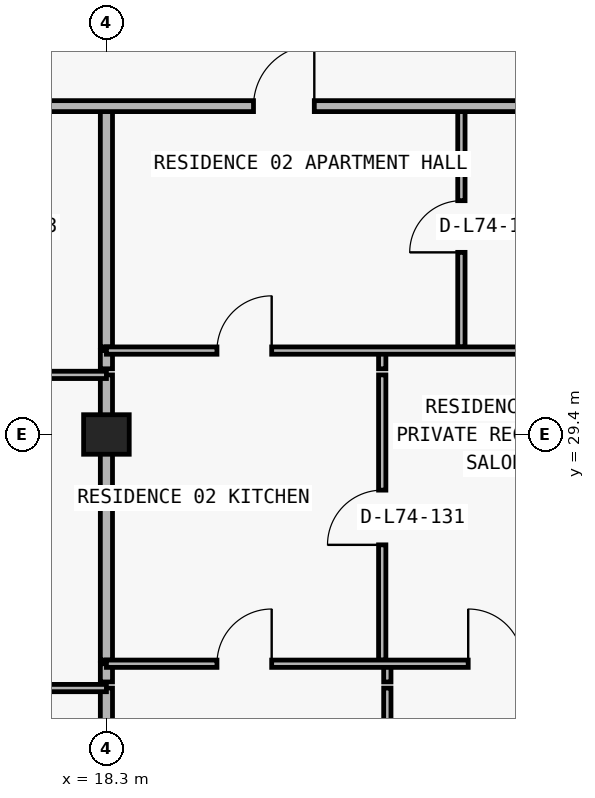
"""IFC4 building model, lengths in metres.
Left out: names, types, materials, properties, quantities, classifications, styles, units other than length and angle.
Written with IfcOpenShell. Run it as: python <this file> out.ifc"""

import sys

from ifc_helpers import new_model, si_unit, direction, frame, frame_2d, origin, origin_2d, place, context, subcontext, project, spatial, rectangle, extrude, element, fill, save


model = new_model("IFC4")
c1 = context("Model", 3, precision=1e-05, world=origin(), true_north=direction((0.0, 1.0)))
c2 = subcontext(c1, "Body", "Model", "MODEL_VIEW")
j1 = project(units=[si_unit("LENGTHUNIT", "METRE"), si_unit("PLANEANGLEUNIT", "RADIAN")], contexts=[c1])
p1 = place(None, origin())
s1 = spatial("IfcSite", under=j1, at=p1, CompositionType="ELEMENT")
p2 = place(p1, origin())
s2 = spatial("IfcBuilding", under=s1, at=p2, CompositionType="ELEMENT")
p3 = place(p2, frame((0.0, 0.0, 262.8)))
s3 = spatial("IfcBuildingStorey", under=s2, at=p3, CompositionType="ELEMENT", Elevation=262.8)
p4 = place(p3, frame((18.3, 29.4, 0.0), z_axis=(0.0, 0.0, 1.0), x_axis=(1.0, 0.0, 0.0)))
e1 = element("IfcColumn", 1, at=p4, inside=s3, PredefinedType="COLUMN", context=c2, shape_type="SweptSolid", body=[
    extrude(rectangle(XDim=0.75, YDim=0.65, at=origin_2d()), origin(), (0.0, 0.0, 1.0), 3.05),
])
p5 = place(p3, frame((18.3, 13.34, 0.0), z_axis=(0.0, 0.0, 1.0), x_axis=(0.0, 1.0, 0.0)))
e2 = element("IfcWall", 2, at=p5, inside=s3, PredefinedType="PARTITIONING", context=c2, shape_type="SweptSolid", body=[
    extrude(rectangle(XDim=11.89, YDim=0.2, at=frame_2d((5.945, 0.0))), origin(), (0.0, 0.0, 1.0), 2.263),
])
p6 = place(p3, frame((18.3, 25.33, 0.0), z_axis=(0.0, 0.0, 1.0), x_axis=(0.0, 1.0, 0.0)))
e3 = element("IfcWall", 3, at=p6, inside=s3, PredefinedType="PARTITIONING", context=c2, shape_type="SweptSolid", body=[
    extrude(rectangle(XDim=0.3, YDim=0.2, at=frame_2d((0.15, 0.0))), origin(), (0.0, 0.0, 1.0), 2.263),
])
p7 = place(p3, frame((18.3, 25.69, 0.0), z_axis=(0.0, 0.0, 1.0), x_axis=(0.0, 1.0, 0.0)))
e4 = element("IfcWall", 4, at=p7, inside=s3, PredefinedType="PARTITIONING", context=c2, shape_type="SweptSolid", body=[
    extrude(rectangle(XDim=4.69, YDim=0.2, at=frame_2d((2.345, 0.0))), origin(), (0.0, 0.0, 1.0), 2.263),
])
p8 = place(p3, frame((18.3, 30.48, 0.0), z_axis=(0.0, 0.0, 1.0), x_axis=(0.0, 1.0, 0.0)))
e5 = element("IfcWall", 5, at=p8, inside=s3, PredefinedType="PARTITIONING", context=c2, shape_type="SweptSolid", body=[
    extrude(rectangle(XDim=0.3, YDim=0.2, at=frame_2d((0.15, 0.0))), origin(), (0.0, 0.0, 1.0), 2.263),
])
p9 = place(p3, frame((18.3, 30.84, 0.0), z_axis=(0.0, 0.0, 1.0), x_axis=(0.0, 1.0, 0.0)))
e6 = element("IfcWall", 6, at=p9, inside=s3, PredefinedType="PARTITIONING", context=c2, shape_type="SweptSolid", body=[
    extrude(rectangle(XDim=3.96, YDim=0.2, at=frame_2d((1.98, 0.0))), origin(), (0.0, 0.0, 1.0), 2.263),
])
p10 = place(p3, frame((22.836, 25.69, 0.0), z_axis=(0.0, 0.0, 1.0), x_axis=(0.0, 1.0, 0.0)))
e7 = element("IfcWall", 7, at=p10, inside=s3, PredefinedType="PARTITIONING", context=c2, shape_type="SweptSolid", body=[
    extrude(rectangle(XDim=4.69, YDim=0.12, at=frame_2d((2.345, 0.0))), origin(), (0.0, 0.0, 1.0), 3.05),
])
p11 = place(p10, frame((1.895, 0.0, 0.0)))
e8 = element("IfcOpeningElement", 8, at=p11, cuts=e7, PredefinedType="OPENING", context=c2, shape_type="SweptSolid", body=[
    extrude(rectangle(XDim=0.9, YDim=2.15, at=frame_2d((0.45, 1.075))), frame((0.0, 0.07, 0.0), z_axis=(0.0, -1.0, 0.0), x_axis=(1.0, 0.0, 0.0)), (0.0, 0.0, 1.0), 0.14),
])
p12 = place(p3, frame((22.836, 30.48, 0.0), z_axis=(0.0, 0.0, 1.0), x_axis=(0.0, 1.0, 0.0)))
e9 = element("IfcWall", 9, at=p12, inside=s3, PredefinedType="PARTITIONING", context=c2, shape_type="SweptSolid", body=[
    extrude(rectangle(XDim=0.3, YDim=0.12, at=frame_2d((0.15, 0.0))), origin(), (0.0, 0.0, 1.0), 3.05),
])
p13 = place(p3, frame((22.92, 13.34, 0.0), z_axis=(0.0, 0.0, 1.0), x_axis=(0.0, 1.0, 0.0)))
e10 = element("IfcWall", 10, at=p13, inside=s3, PredefinedType="PARTITIONING", context=c2, shape_type="SweptSolid", body=[
    extrude(rectangle(XDim=11.89, YDim=0.12, at=frame_2d((5.945, 0.0))), origin(), (0.0, 0.0, 1.0), 3.05),
])
p14 = place(p3, frame((22.92, 25.33, 0.0), z_axis=(0.0, 0.0, 1.0), x_axis=(0.0, 1.0, 0.0)))
e11 = element("IfcWall", 11, at=p14, inside=s3, PredefinedType="PARTITIONING", context=c2, shape_type="SweptSolid", body=[
    extrude(rectangle(XDim=0.3, YDim=0.12, at=frame_2d((0.15, 0.0))), origin(), (0.0, 0.0, 1.0), 3.05),
])
p15 = place(p3, frame((24.138, 30.84, 0.0), z_axis=(0.0, 0.0, 1.0), x_axis=(0.0, 1.0, 0.0)))
e12 = element("IfcWall", 12, at=p15, inside=s3, PredefinedType="PARTITIONING", context=c2, shape_type="SweptSolid", body=[
    extrude(rectangle(XDim=3.96, YDim=0.12, at=frame_2d((1.98, 0.0))), origin(), (0.0, 0.0, 1.0), 3.05),
])
p16 = place(p15, frame((1.555, 0.0, 0.0)))
e13 = element("IfcOpeningElement", 13, at=p16, cuts=e12, PredefinedType="OPENING", context=c2, shape_type="SweptSolid", body=[
    extrude(rectangle(XDim=0.85, YDim=2.1, at=frame_2d((0.425, 1.05))), frame((0.0, 0.07, 0.0), z_axis=(0.0, -1.0, 0.0), x_axis=(1.0, 0.0, 0.0)), (0.0, 0.0, 1.0), 0.14),
])
p17 = place(p3, frame((15.203, 25.23, 0.0), z_axis=(0.0, 0.0, 1.0), x_axis=(1.0, 0.0, 0.0)))
e14 = element("IfcWall", 14, at=p17, inside=s3, PredefinedType="PARTITIONING", context=c2, shape_type="SweptSolid", body=[
    extrude(rectangle(XDim=3.097, YDim=0.12, at=frame_2d((1.549, 0.0))), origin(), (0.0, 0.0, 1.0), 3.05),
])
p18 = place(p17, frame((1.098, 0.0, 0.0)))
e15 = element("IfcOpeningElement", 15, at=p18, cuts=e14, PredefinedType="OPENING", context=c2, shape_type="SweptSolid", body=[
    extrude(rectangle(XDim=0.9, YDim=2.15, at=frame_2d((0.45, 1.075))), frame((0.0, 0.07, 0.0), z_axis=(0.0, -1.0, 0.0), x_axis=(1.0, 0.0, 0.0)), (0.0, 0.0, 1.0), 0.14),
])
p19 = place(p3, frame((18.3, 25.63, 0.0), z_axis=(0.0, 0.0, 1.0), x_axis=(1.0, 0.0, 0.0)))
e16 = element("IfcWall", 16, at=p19, inside=s3, PredefinedType="PARTITIONING", context=c2, shape_type="SweptSolid", body=[
    extrude(rectangle(XDim=8.18, YDim=0.12, at=frame_2d((4.09, 0.0))), origin(), (0.0, 0.0, 1.0), 3.05),
])
p20 = place(p19, frame((1.818, 0.0, 0.0)))
e17 = element("IfcOpeningElement", 17, at=p20, cuts=e16, PredefinedType="OPENING", context=c2, shape_type="SweptSolid", body=[
    extrude(rectangle(XDim=0.9, YDim=2.15, at=frame_2d((0.45, 1.075))), frame((0.0, 0.07, 0.0), z_axis=(0.0, -1.0, 0.0), x_axis=(1.0, 0.0, 0.0)), (0.0, 0.0, 1.0), 0.14),
])
p21 = place(p19, frame((5.95, 0.0, 0.0)))
e18 = element("IfcOpeningElement", 18, at=p21, cuts=e16, PredefinedType="OPENING", context=c2, shape_type="SweptSolid", body=[
    extrude(rectangle(XDim=0.9, YDim=2.15, at=frame_2d((0.45, 1.075))), frame((0.0, 0.07, 0.0), z_axis=(0.0, -1.0, 0.0), x_axis=(1.0, 0.0, 0.0)), (0.0, 0.0, 1.0), 0.14),
])
p22 = place(p3, frame((15.203, 30.38, 0.0), z_axis=(0.0, 0.0, 1.0), x_axis=(1.0, 0.0, 0.0)))
e19 = element("IfcWall", 19, at=p22, inside=s3, PredefinedType="PARTITIONING", context=c2, shape_type="SweptSolid", body=[
    extrude(rectangle(XDim=3.097, YDim=0.12, at=frame_2d((1.549, 0.0))), origin(), (0.0, 0.0, 1.0), 3.05),
])
p23 = place(p3, frame((18.3, 30.78, 0.0), z_axis=(0.0, 0.0, 1.0), x_axis=(1.0, 0.0, 0.0)))
e20 = element("IfcWall", 20, at=p23, inside=s3, PredefinedType="PARTITIONING", context=c2, shape_type="SweptSolid", body=[
    extrude(rectangle(XDim=8.4, YDim=0.12, at=frame_2d((4.2, 0.0))), origin(), (0.0, 0.0, 1.0), 3.05),
])
p24 = place(p23, frame((1.818, 0.0, 0.0)))
e21 = element("IfcOpeningElement", 21, at=p24, cuts=e20, PredefinedType="OPENING", context=c2, shape_type="SweptSolid", body=[
    extrude(rectangle(XDim=0.9, YDim=2.15, at=frame_2d((0.45, 1.075))), frame((0.0, 0.07, 0.0), z_axis=(0.0, -1.0, 0.0), x_axis=(1.0, 0.0, 0.0)), (0.0, 0.0, 1.0), 0.14),
])
p25 = place(p3, frame((15.203, 34.8, 0.0), z_axis=(0.0, 0.0, 1.0), x_axis=(1.0, 0.0, 0.0)))
e22 = element("IfcWall", 22, at=p25, inside=s3, PredefinedType="PARTITIONING", context=c2, shape_type="SweptSolid", body=[
    extrude(rectangle(XDim=16.283, YDim=0.18, at=frame_2d((8.142, 0.0))), origin(), (0.0, 0.0, 1.0), 3.05),
])
p26 = place(p25, frame((5.516, 0.0, 0.0)))
e23 = element("IfcOpeningElement", 23, at=p26, cuts=e22, PredefinedType="OPENING", context=c2, shape_type="SweptSolid", body=[
    extrude(rectangle(XDim=1.0, YDim=2.2, at=frame_2d((0.5, 1.1))), frame((0.0, 0.1, 0.0), z_axis=(0.0, -1.0, 0.0), x_axis=(1.0, 0.0, 0.0)), (0.0, 0.0, 1.0), 0.2),
])
p27 = place(p25, frame((13.39, 0.0, 0.0)))
e24 = element("IfcOpeningElement", 24, at=p27, cuts=e22, PredefinedType="OPENING", context=c2, shape_type="SweptSolid", body=[
    extrude(rectangle(XDim=1.0, YDim=2.2, at=frame_2d((0.5, 1.1))), frame((0.0, 0.1, 0.0), z_axis=(0.0, -1.0, 0.0), x_axis=(1.0, 0.0, 0.0)), (0.0, 0.0, 1.0), 0.2),
])
p28 = place(p26, origin())
e25 = element("IfcDoor", 25, at=p28, inside=s3, OperationType="SINGLE_SWING_RIGHT", PredefinedType="DOOR", context=c2, shape_type="SweptSolid", body=[
    extrude(rectangle(XDim=1.0, YDim=2.2, at=frame_2d((0.5, 1.1))), frame((0.0, 0.025, 0.0), z_axis=(0.0, -1.0, 0.0), x_axis=(1.0, 0.0, 0.0)), (0.0, 0.0, 1.0), 0.05),
])
fill(e23, e25)
p29 = place(p16, origin())
e26 = element("IfcDoor", 26, at=p29, inside=s3, OperationType="SINGLE_SWING_LEFT", PredefinedType="DOOR", context=c2, shape_type="SweptSolid", body=[
    extrude(rectangle(XDim=0.85, YDim=2.1, at=frame_2d((0.425, 1.05))), frame((0.0, 0.025, 0.0), z_axis=(0.0, -1.0, 0.0), x_axis=(1.0, 0.0, 0.0)), (0.0, 0.0, 1.0), 0.05),
])
fill(e13, e26)
p30 = place(p24, origin())
e27 = element("IfcDoor", 27, at=p30, inside=s3, OperationType="SINGLE_SWING_RIGHT", PredefinedType="DOOR", context=c2, shape_type="SweptSolid", body=[
    extrude(rectangle(XDim=0.9, YDim=2.15, at=frame_2d((0.45, 1.075))), frame((0.0, 0.025, 0.0), z_axis=(0.0, -1.0, 0.0), x_axis=(1.0, 0.0, 0.0)), (0.0, 0.0, 1.0), 0.05),
])
fill(e21, e27)
p31 = place(p11, origin())
e28 = element("IfcDoor", 28, at=p31, inside=s3, OperationType="SINGLE_SWING_LEFT", PredefinedType="DOOR", context=c2, shape_type="SweptSolid", body=[
    extrude(rectangle(XDim=0.9, YDim=2.15, at=frame_2d((0.45, 1.075))), frame((0.0, 0.025, 0.0), z_axis=(0.0, -1.0, 0.0), x_axis=(1.0, 0.0, 0.0)), (0.0, 0.0, 1.0), 0.05),
])
fill(e8, e28)
p32 = place(p20, origin())
e29 = element("IfcDoor", 29, at=p32, inside=s3, OperationType="SINGLE_SWING_RIGHT", PredefinedType="DOOR", context=c2, shape_type="SweptSolid", body=[
    extrude(rectangle(XDim=0.9, YDim=2.15, at=frame_2d((0.45, 1.075))), frame((0.0, 0.025, 0.0), z_axis=(0.0, -1.0, 0.0), x_axis=(1.0, 0.0, 0.0)), (0.0, 0.0, 1.0), 0.05),
])
fill(e17, e29)
p33 = place(p21, origin())
e30 = element("IfcDoor", 30, at=p33, inside=s3, OperationType="SINGLE_SWING_LEFT", PredefinedType="DOOR", context=c2, shape_type="SweptSolid", body=[
    extrude(rectangle(XDim=0.9, YDim=2.15, at=frame_2d((0.45, 1.075))), frame((0.0, 0.025, 0.0), z_axis=(0.0, -1.0, 0.0), x_axis=(1.0, 0.0, 0.0)), (0.0, 0.0, 1.0), 0.05),
])
fill(e18, e30)
save(model, sys.argv[1])
